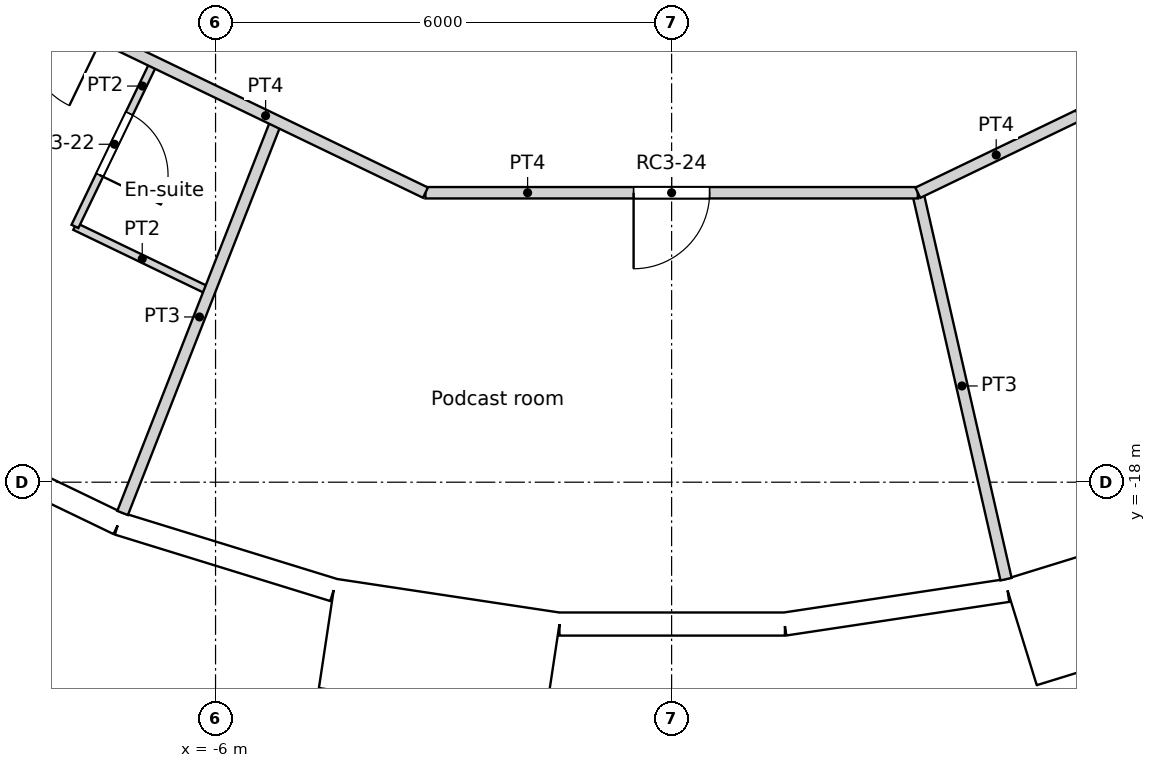
"""IFC4 building model, lengths in metres.
Left out: names, types, materials, properties, quantities, classifications, styles, units other than length and angle.
Written with IfcOpenShell. Run it as: python <this file> out.ifc"""

import sys

from ifc_helpers import new_model, si_unit, direction, frame, frame_2d, origin, origin_2d, place, context, subcontext, project, spatial, rectangle, circle, extrude, element, fill, save


model = new_model("IFC4")
c1 = context("Model", 3, precision=1e-05, world=origin(), true_north=direction((0.0, 1.0)))
c2 = subcontext(c1, "Body", "Model", "MODEL_VIEW")
j1 = project(units=[si_unit("LENGTHUNIT", "METRE"), si_unit("PLANEANGLEUNIT", "RADIAN")], contexts=[c1])
p1 = place(None, origin())
s1 = spatial("IfcSite", under=j1, at=p1, CompositionType="ELEMENT")
p2 = place(p1, origin())
s2 = spatial("IfcBuilding", under=s1, at=p2, CompositionType="ELEMENT")
p3 = place(p2, frame((0.0, 0.0, 252.6)))
s3 = spatial("IfcBuildingStorey", under=s2, at=p3, CompositionType="ELEMENT", Elevation=252.6)
for number, where, z_axis, x_axis in (
    (1, (-4.188, -18.35, 0.0), (0.0, 0.0, 1.0), (1.0, 0.0, 0.0)),
    (2, (1.406, -18.77, 0.0), (0.0, 0.0, 1.0), (1.0, 0.0, 0.0)),
):
    element("IfcColumn", number, at=place(p3, frame(where, z_axis=z_axis, x_axis=x_axis)), inside=s3, PredefinedType="COLUMN", context=c2, shape_type="SweptSolid", body=[
        extrude(circle(Radius=0.55, at=origin_2d()), origin(), (0.0, 0.0, 1.0), 3.6),
    ])
p4 = place(p3, frame((-9.947, -17.259, 0.0), z_axis=(0.0, 0.0, 1.0), x_axis=(0.900939615635, -0.433944476838, 0.0)))
e3 = element("IfcWall", 3, at=p4, inside=s3, PredefinedType="SOLIDWALL", context=c2, shape_type="SweptSolid", body=[
    extrude(rectangle(XDim=2.962, YDim=0.3, at=frame_2d((1.481, 0.0))), origin(), (0.0, 0.0, 1.0), 3.25),
])
p5 = place(p4, frame((1.481, 0.0, 1.55)))
e4 = element("IfcOpeningElement", 4, at=p5, cuts=e3, PredefinedType="OPENING", context=c2, shape_type="SweptSolid", body=[
    extrude(circle(Radius=0.9, at=origin_2d()), frame((0.0, 0.16, 0.0), z_axis=(0.0, -1.0, 0.0), x_axis=(1.0, 0.0, 0.0)), (0.0, 0.0, 1.0), 0.32),
])
p6 = place(p3, frame((-7.278, -18.545, 0.0), z_axis=(0.0, 0.0, 1.0), x_axis=(0.95558635705, -0.294711238707, 0.0)))
e5 = element("IfcWall", 5, at=p6, inside=s3, PredefinedType="SOLIDWALL", context=c2, shape_type="SweptSolid", body=[
    extrude(rectangle(XDim=2.962, YDim=0.3, at=frame_2d((1.481, 0.0))), origin(), (0.0, 0.0, 1.0), 3.25),
])
p7 = place(p6, frame((1.481, 0.0, 1.55)))
e6 = element("IfcOpeningElement", 6, at=p7, cuts=e5, PredefinedType="OPENING", context=c2, shape_type="SweptSolid", body=[
    extrude(circle(Radius=0.9, at=origin_2d()), frame((0.0, 0.16, 0.0), z_axis=(0.0, -1.0, 0.0), x_axis=(1.0, 0.0, 0.0)), (0.0, 0.0, 1.0), 0.32),
])
p8 = place(p3, frame((-4.53, -19.989, -0.35), z_axis=(0.0, 0.0, 1.0), x_axis=(0.988836445254, -0.149004981587, 0.0)))
e7 = element("IfcWall", 7, at=p8, inside=s3, PredefinedType="ELEMENTEDWALL", context=c2, shape_type="SweptSolid", body=[
    extrude(rectangle(XDim=3.0, YDim=1.45, at=frame_2d((1.5, 0.0))), origin(), (0.0, 0.0, 1.0), 3.6),
])
p9 = place(p8, frame((1.5, 0.0, 1.9)))
e8 = element("IfcOpeningElement", 8, at=p9, cuts=e7, PredefinedType="OPENING", context=c2, shape_type="SweptSolid", body=[
    extrude(circle(Radius=0.9, at=origin_2d()), frame((0.0, 0.735, 0.0), z_axis=(0.0, -1.0, 0.0), x_axis=(1.0, 0.0, 0.0)), (0.0, 0.0, 1.0), 1.47),
])
p10 = place(p3, frame((-1.473, -19.866, 0.0), z_axis=(0.0, 0.0, 1.0), x_axis=(1.0, 0.0, 0.0)))
e9 = element("IfcWall", 9, at=p10, inside=s3, PredefinedType="SOLIDWALL", context=c2, shape_type="SweptSolid", body=[
    extrude(rectangle(XDim=2.962, YDim=0.3, at=frame_2d((1.481, 0.0))), origin(), (0.0, 0.0, 1.0), 3.25),
])
p11 = place(p10, frame((1.481, 0.0, 1.55)))
e10 = element("IfcOpeningElement", 10, at=p11, cuts=e9, PredefinedType="OPENING", context=c2, shape_type="SweptSolid", body=[
    extrude(circle(Radius=0.9, at=origin_2d()), frame((0.0, 0.16, 0.0), z_axis=(0.0, -1.0, 0.0), x_axis=(1.0, 0.0, 0.0)), (0.0, 0.0, 1.0), 0.32),
])
p12 = place(p3, frame((1.489, -19.866, 0.0), z_axis=(0.0, 0.0, 1.0), x_axis=(0.988835775663, 0.149009425104, 0.0)))
e11 = element("IfcWall", 11, at=p12, inside=s3, PredefinedType="SOLIDWALL", context=c2, shape_type="SweptSolid", body=[
    extrude(rectangle(XDim=2.962, YDim=0.3, at=frame_2d((1.481, 0.0))), origin(), (0.0, 0.0, 1.0), 3.25),
])
p13 = place(p12, frame((1.481, 0.0, 1.55)))
e12 = element("IfcOpeningElement", 12, at=p13, cuts=e11, PredefinedType="OPENING", context=c2, shape_type="SweptSolid", body=[
    extrude(circle(Radius=0.9, at=origin_2d()), frame((0.0, 0.16, 0.0), z_axis=(0.0, -1.0, 0.0), x_axis=(1.0, 0.0, 0.0)), (0.0, 0.0, 1.0), 0.32),
])
p14 = place(p3, frame((4.592, -19.975, -0.35), z_axis=(0.0, 0.0, 1.0), x_axis=(0.955571139978, 0.294760574774, 0.0)))
e13 = element("IfcWall", 13, at=p14, inside=s3, PredefinedType="ELEMENTEDWALL", context=c2, shape_type="SweptSolid", body=[
    extrude(rectangle(XDim=3.0, YDim=1.45, at=frame_2d((1.5, 0.0))), origin(), (0.0, 0.0, 1.0), 3.6),
])
p15 = place(p14, frame((1.5, 0.0, 1.9)))
e14 = element("IfcOpeningElement", 14, at=p15, cuts=e13, PredefinedType="OPENING", context=c2, shape_type="SweptSolid", body=[
    extrude(circle(Radius=0.9, at=origin_2d()), frame((0.0, 0.735, 0.0), z_axis=(0.0, -1.0, 0.0), x_axis=(1.0, 0.0, 0.0)), (0.0, 0.0, 1.0), 1.47),
])
p16 = place(p3, frame((-9.076, -11.381, 0.0), z_axis=(0.0, 0.0, 1.0), x_axis=(0.901070942113, -0.433671716024, 0.0)))
e15 = element("IfcWall", 15, at=p16, inside=s3, PredefinedType="PARTITIONING", context=c2, shape_type="SweptSolid", body=[
    extrude(rectangle(XDim=6.479, YDim=0.15, at=frame_2d((3.239, 0.0))), origin(), (0.0, 0.0, 1.0), 3.25),
])
p17 = place(p16, frame((0.76, 0.0, 0.0)))
e16 = element("IfcOpeningElement", 16, at=p17, cuts=e15, PredefinedType="OPENING", context=c2, shape_type="SweptSolid", body=[
    extrude(rectangle(XDim=1.0, YDim=2.1, at=frame_2d((0.5, 1.05))), frame((0.0, 0.075, 0.0), z_axis=(0.0, -1.0, 0.0), x_axis=(1.0, 0.0, 0.0)), (0.0, 0.0, 1.0), 0.15),
])
p18 = place(p3, frame((-3.239, -14.192, 0.0), z_axis=(0.0, 0.0, 1.0), x_axis=(1.0, 0.0, 0.0)))
e17 = element("IfcWall", 17, at=p18, inside=s3, PredefinedType="PARTITIONING", context=c2, shape_type="SweptSolid", body=[
    extrude(rectangle(XDim=6.478, YDim=0.15, at=frame_2d((3.239, 0.0))), origin(), (0.0, 0.0, 1.0), 3.25),
])
p19 = place(p18, frame((2.739, 0.0, 0.0)))
e18 = element("IfcOpeningElement", 18, at=p19, cuts=e17, PredefinedType="OPENING", context=c2, shape_type="SweptSolid", body=[
    extrude(rectangle(XDim=1.0, YDim=2.04, at=frame_2d((0.5, 1.02))), frame((0.0, 0.075, 0.0), z_axis=(0.0, -1.0, 0.0), x_axis=(1.0, 0.0, 0.0)), (0.0, 0.0, 1.0), 0.15),
])
p20 = place(p3, frame((3.239, -14.192, 0.0), z_axis=(0.0, 0.0, 1.0), x_axis=(0.900976027191, 0.433868872388, 0.0)))
e19 = element("IfcWall", 19, at=p20, inside=s3, PredefinedType="PARTITIONING", context=c2, shape_type="SweptSolid", body=[
    extrude(rectangle(XDim=6.479, YDim=0.15, at=frame_2d((3.239, 0.0))), origin(), (0.0, 0.0, 1.0), 3.25),
])
p21 = place(p20, frame((2.34, 0.0, 0.0)))
e20 = element("IfcOpeningElement", 20, at=p21, cuts=e19, PredefinedType="OPENING", context=c2, shape_type="SweptSolid", body=[
    extrude(rectangle(XDim=1.8, YDim=2.1, at=frame_2d((0.9, 1.05))), frame((0.0, 0.075, 0.0), z_axis=(0.0, -1.0, 0.0), x_axis=(1.0, 0.0, 0.0)), (0.0, 0.0, 1.0), 0.15),
])
p22 = place(p3, frame((-7.85, -14.635, 0.0), z_axis=(0.0, 0.0, 1.0), x_axis=(0.433815618773, 0.901001669759, 0.0)))
e21 = element("IfcWall", 21, at=p22, inside=s3, PredefinedType="PARTITIONING", context=c2, shape_type="SweptSolid", body=[
    extrude(rectangle(XDim=2.4, YDim=0.1, at=frame_2d((1.2, 0.0))), origin(), (0.0, 0.0, 1.0), 3.25),
])
p23 = place(p22, frame((0.75, 0.0, 0.0)))
e22 = element("IfcOpeningElement", 22, at=p23, cuts=e21, PredefinedType="OPENING", context=c2, shape_type="SweptSolid", body=[
    extrude(rectangle(XDim=0.9, YDim=2.04, at=frame_2d((0.45, 1.02))), frame((0.0, 0.05, 0.0), z_axis=(0.0, -1.0, 0.0), x_axis=(1.0, 0.0, 0.0)), (0.0, 0.0, 1.0), 0.1),
])
p24 = place(p3, frame((-7.85, -14.635, 0.0), z_axis=(0.0, 0.0, 1.0), x_axis=(0.900936932599, -0.433950047216, 0.0)))
e23 = element("IfcWall", 23, at=p24, inside=s3, PredefinedType="PARTITIONING", context=c2, shape_type="SweptSolid", body=[
    extrude(rectangle(XDim=1.966, YDim=0.1, at=frame_2d((0.983, 0.0))), origin(), (0.0, 0.0, 1.0), 3.25),
])
p25 = place(p3, frame((-7.223, -18.405, 0.0), z_axis=(0.0, 0.0, 1.0), x_axis=(0.36511374114, 0.930962918719, 0.0)))
e24 = element("IfcWall", 24, at=p25, inside=s3, PredefinedType="PARTITIONING", context=c2, shape_type="SweptSolid", body=[
    extrude(rectangle(XDim=5.54, YDim=0.15, at=frame_2d((2.77, 0.0))), origin(), (0.0, 0.0, 1.0), 3.25),
])
p26 = place(p3, frame((3.239, -14.192, 0.0), z_axis=(0.0, 0.0, 1.0), x_axis=(0.222612505682, -0.974907007008, 0.0)))
e25 = element("IfcWall", 25, at=p26, inside=s3, PredefinedType="PARTITIONING", context=c2, shape_type="SweptSolid", body=[
    extrude(rectangle(XDim=5.215, YDim=0.15, at=frame_2d((2.607, 0.0))), origin(), (0.0, 0.0, 1.0), 3.25),
])
p27 = place(p5, origin())
e26 = element("IfcWindow", 26, at=p27, inside=s3, PartitioningType="SINGLE_PANEL", PredefinedType="WINDOW", context=c2, shape_type="SweptSolid", body=[
    extrude(circle(Radius=0.9, at=origin_2d()), frame((0.0, 0.12, 0.0), z_axis=(0.0, -1.0, 0.0), x_axis=(1.0, 0.0, 0.0)), (0.0, 0.0, 1.0), 0.1),
])
fill(e4, e26)
p28 = place(p7, origin())
e27 = element("IfcWindow", 27, at=p28, inside=s3, PartitioningType="SINGLE_PANEL", PredefinedType="WINDOW", context=c2, shape_type="SweptSolid", body=[
    extrude(circle(Radius=0.9, at=origin_2d()), frame((0.0, 0.12, 0.0), z_axis=(0.0, -1.0, 0.0), x_axis=(1.0, 0.0, 0.0)), (0.0, 0.0, 1.0), 0.1),
])
fill(e6, e27)
p29 = place(p9, origin())
e28 = element("IfcWindow", 28, at=p29, inside=s3, PartitioningType="SINGLE_PANEL", PredefinedType="WINDOW", context=c2, shape_type="SweptSolid", body=[
    extrude(circle(Radius=0.9, at=origin_2d()), frame((0.0, 0.695, 0.0), z_axis=(0.0, -1.0, 0.0), x_axis=(1.0, 0.0, 0.0)), (0.0, 0.0, 1.0), 0.1),
])
fill(e8, e28)
p30 = place(p11, origin())
e29 = element("IfcWindow", 29, at=p30, inside=s3, PartitioningType="SINGLE_PANEL", PredefinedType="WINDOW", context=c2, shape_type="SweptSolid", body=[
    extrude(circle(Radius=0.9, at=origin_2d()), frame((0.0, 0.12, 0.0), z_axis=(0.0, -1.0, 0.0), x_axis=(1.0, 0.0, 0.0)), (0.0, 0.0, 1.0), 0.1),
])
fill(e10, e29)
p31 = place(p13, origin())
e30 = element("IfcWindow", 30, at=p31, inside=s3, PartitioningType="SINGLE_PANEL", PredefinedType="WINDOW", context=c2, shape_type="SweptSolid", body=[
    extrude(circle(Radius=0.9, at=origin_2d()), frame((0.0, 0.12, 0.0), z_axis=(0.0, -1.0, 0.0), x_axis=(1.0, 0.0, 0.0)), (0.0, 0.0, 1.0), 0.1),
])
fill(e12, e30)
p32 = place(p15, origin())
e31 = element("IfcWindow", 31, at=p32, inside=s3, PartitioningType="SINGLE_PANEL", PredefinedType="WINDOW", context=c2, shape_type="SweptSolid", body=[
    extrude(circle(Radius=0.9, at=origin_2d()), frame((0.0, 0.695, 0.0), z_axis=(0.0, -1.0, 0.0), x_axis=(1.0, 0.0, 0.0)), (0.0, 0.0, 1.0), 0.1),
])
fill(e14, e31)
p33 = place(p23, origin())
e32 = element("IfcDoor", 32, at=p33, inside=s3, OperationType="SINGLE_SWING_RIGHT", PredefinedType="DOOR", context=c2, shape_type="SweptSolid", body=[
    extrude(rectangle(XDim=0.9, YDim=2.04, at=frame_2d((0.45, 1.02))), frame((0.0, 0.025, 0.0), z_axis=(0.0, -1.0, 0.0), x_axis=(1.0, 0.0, 0.0)), (0.0, 0.0, 1.0), 0.05),
])
fill(e22, e32)
p34 = place(p19, origin())
e33 = element("IfcDoor", 33, at=p34, inside=s3, OperationType="SINGLE_SWING_RIGHT", PredefinedType="DOOR", context=c2, shape_type="SweptSolid", body=[
    extrude(rectangle(XDim=1.0, YDim=2.04, at=frame_2d((0.5, 1.02))), frame((0.0, 0.025, 0.0), z_axis=(0.0, -1.0, 0.0), x_axis=(1.0, 0.0, 0.0)), (0.0, 0.0, 1.0), 0.05),
])
fill(e18, e33)
save(model, sys.argv[1])
